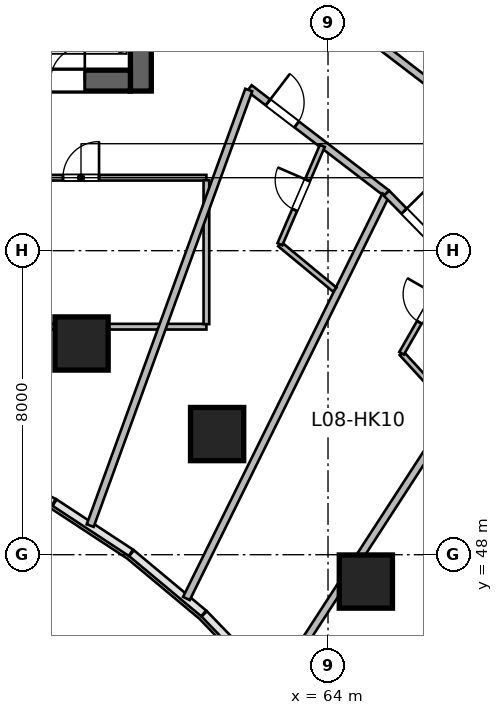
"""IFC4 building model, lengths in metres.
Left out: names, types, materials, properties, quantities, classifications, styles, units other than length and angle.
Written with IfcOpenShell. Run it as: python <this file> out.ifc"""

import sys

from ifc_helpers import new_model, si_unit, direction, frame, frame_2d, origin, origin_2d, place, context, subcontext, project, spatial, rectangle, circle, extrude, source, transform, mapped, element, fill, save


model = new_model("IFC4")
c1 = context("Model", 3, precision=1e-05, world=origin(), true_north=direction((0.0, 1.0)))
c2 = subcontext(c1, "Body", "Model", "MODEL_VIEW")
j1 = project(units=[si_unit("LENGTHUNIT", "METRE"), si_unit("PLANEANGLEUNIT", "RADIAN")], contexts=[c1])
p1 = place(None, origin())
s1 = spatial("IfcSite", under=j1, at=p1, CompositionType="ELEMENT")
p2 = place(p1, origin())
s2 = spatial("IfcBuilding", under=s1, at=p2, CompositionType="ELEMENT")
p3 = place(p2, frame((0.0, 0.0, 42.6)))
s3 = spatial("IfcBuildingStorey", under=s2, at=p3, CompositionType="ELEMENT", Elevation=42.6)
m1 = source(origin(), c2, "Body", "SweptSolid", [
    extrude(rectangle(XDim=12.0, YDim=0.55, at=frame_2d((6.0, 0.0))), origin(), (0.0, 0.0, 1.0), 3.6),
])
p4 = place(p3, frame((59.075, 60.2, 0.0), z_axis=(0.0, 0.0, 1.0), x_axis=(0.0, 1.0, 0.0)))
e1 = element("IfcWall", 1, at=p4, inside=s3, PredefinedType="SHEAR", context=c2, shape_type="MappedRepresentation", body=[
    mapped(m1, transform((0.0, 0.0, 0.0), scale=1.0)),
])
m2 = source(origin(), c2, "Body", "SweptSolid", [
    extrude(rectangle(XDim=21.6, YDim=0.55, at=frame_2d((10.8, 0.0))), origin(), (0.0, 0.0, 1.0), 3.6),
])
p5 = place(p3, frame((37.2, 60.475, 0.0), z_axis=(0.0, 0.0, 1.0), x_axis=(1.0, 0.0, 0.0)))
e2 = element("IfcWall", 2, at=p5, inside=s3, PredefinedType="SHEAR", context=c2, shape_type="MappedRepresentation", body=[
    mapped(m2, transform((0.0, 0.0, 0.0), scale=1.0)),
])
p6 = place(p5, frame((1.1, 0.0, 0.0)))
e3 = element("IfcOpeningElement", 3, at=p6, cuts=e2, PredefinedType="OPENING", context=c2, shape_type="SweptSolid", body=[
    extrude(rectangle(XDim=1.15, YDim=2.15, at=frame_2d((0.575, 1.075))), frame((0.0, 0.285, 0.0), z_axis=(0.0, -1.0, 0.0), x_axis=(1.0, 0.0, 0.0)), (0.0, 0.0, 1.0), 0.57),
])
p7 = place(p5, frame((19.5, 0.0, 0.0)))
e4 = element("IfcOpeningElement", 4, at=p7, cuts=e2, PredefinedType="OPENING", context=c2, shape_type="SweptSolid", body=[
    extrude(rectangle(XDim=0.9, YDim=2.1, at=frame_2d((0.45, 1.05))), frame((0.0, 0.285, 0.0), z_axis=(0.0, -1.0, 0.0), x_axis=(1.0, 0.0, 0.0)), (0.0, 0.0, 1.0), 0.57),
])
p8 = place(p5, frame((12.02, 0.0, 0.0)))
e5 = element("IfcOpeningElement", 5, at=p8, cuts=e2, PredefinedType="OPENING", context=c2, shape_type="SweptSolid", body=[
    extrude(rectangle(XDim=1.6, YDim=2.15, at=frame_2d((0.8, 1.075))), frame((0.0, 0.285, 0.0), z_axis=(0.0, -1.0, 0.0), x_axis=(1.0, 0.0, 0.0)), (0.0, 0.0, 1.0), 0.57),
])
m3 = source(origin(), c2, "Body", "SweptSolid", [
    extrude(circle(Radius=0.7, at=origin_2d()), origin(), (0.0, 0.0, 1.0), 3.6),
])
for number, where, z_axis, x_axis in (
    (6, (57.515, 53.558, 0.0), (0.0, 0.0, 1.0), (0.289, 0.957, 0.0)),
    (7, (61.082, 51.175, 0.0), (0.0, 0.0, 1.0), (0.409, 0.912, 0.0)),
    (8, (64.996, 47.294, 0.0), (0.0, 0.0, 1.0), (0.558, 0.83, 0.0)),
):
    element("IfcColumn", number, at=place(p3, frame(where, z_axis=z_axis, x_axis=x_axis)), inside=s3, PredefinedType="COLUMN", context=c2, shape_type="MappedRepresentation", body=[
        mapped(m3, transform((0.0, 0.0, 0.0), scale=1.0)),
    ])
m4 = source(origin(), c2, "Body", "SweptSolid", [
    extrude(rectangle(XDim=6.6, YDim=0.15, at=frame_2d((3.3, 0.0))), origin(), (0.0, 0.0, 1.0), 2.803),
])
p9 = place(p3, frame((54.2, 54.0, 0.0), z_axis=(0.0, 0.0, 1.0), x_axis=(1.0, 0.0, 0.0)))
e9 = element("IfcWall", 9, at=p9, inside=s3, PredefinedType="PARTITIONING", context=c2, shape_type="MappedRepresentation", body=[
    mapped(m4, transform((0.0, 0.0, 0.0), scale=1.0)),
])
m5 = source(origin(), c2, "Body", "SweptSolid", [
    extrude(rectangle(XDim=6.6, YDim=0.15, at=frame_2d((3.3, 0.0))), origin(), (0.0, 0.0, 1.0), 3.36),
])
p10 = place(p3, frame((54.2, 57.92, 0.0), z_axis=(0.0, 0.0, 1.0), x_axis=(1.0, 0.0, 0.0)))
e10 = element("IfcWall", 10, at=p10, inside=s3, PredefinedType="PARTITIONING", context=c2, shape_type="MappedRepresentation", body=[
    mapped(m5, transform((0.0, 0.0, 0.0), scale=1.0)),
])
p11 = place(p10, frame((2.825, 0.0, 0.0)))
e11 = element("IfcOpeningElement", 11, at=p11, cuts=e10, PredefinedType="OPENING", context=c2, shape_type="SweptSolid", body=[
    extrude(rectangle(XDim=0.95, YDim=2.1, at=frame_2d((0.475, 1.05))), frame((0.0, 0.085, 0.0), z_axis=(0.0, -1.0, 0.0), x_axis=(1.0, 0.0, 0.0)), (0.0, 0.0, 1.0), 0.17),
])
m6 = source(origin(), c2, "Body", "SweptSolid", [
    extrude(rectangle(XDim=3.785, YDim=0.15, at=frame_2d((1.893, 0.0))), origin(), (0.0, 0.0, 1.0), 3.36),
])
p12 = place(p3, frame((60.8, 54.067, 0.0), z_axis=(0.0, 0.0, 1.0), x_axis=(0.0, 1.0, 0.0)))
e12 = element("IfcWall", 12, at=p12, inside=s3, PredefinedType="PARTITIONING", context=c2, shape_type="MappedRepresentation", body=[
    mapped(m6, transform((0.0, 0.0, 0.0), scale=1.0)),
])
m7 = source(origin(), c2, "Body", "SweptSolid", [
    extrude(rectangle(XDim=4.895, YDim=0.195, at=frame_2d((2.447, 0.0))), origin(), (0.0, 0.0, 1.0), 3.36),
])
p13 = place(p3, frame((63.001, 63.214, 0.0), z_axis=(0.0, 0.0, 1.0), x_axis=(0.793896075849, -0.608053468661, 0.0)))
e13 = element("IfcWall", 13, at=p13, inside=s3, PredefinedType="PARTITIONING", context=c2, shape_type="MappedRepresentation", body=[
    mapped(m7, transform((0.0, 0.0, 0.0), scale=1.0)),
])
p14 = place(p13, frame((0.7, 0.0, 0.0)))
e14 = element("IfcOpeningElement", 14, at=p14, cuts=e13, PredefinedType="OPENING", context=c2, shape_type="SweptSolid", body=[
    extrude(rectangle(XDim=0.95, YDim=2.15, at=frame_2d((0.475, 1.075))), frame((0.0, 0.107, 0.0), z_axis=(0.0, -1.0, 0.0), x_axis=(1.0, 0.0, 0.0)), (0.0, 0.0, 1.0), 0.215),
])
m8 = source(origin(), c2, "Body", "SweptSolid", [
    extrude(rectangle(XDim=4.546, YDim=0.195, at=frame_2d((2.273, 0.0))), origin(), (0.0, 0.0, 1.0), 3.36),
])
p15 = place(p3, frame((61.931, 60.275, 0.0), z_axis=(0.0, 0.0, 1.0), x_axis=(0.793907931297, -0.608037989457, 0.0)))
e15 = element("IfcWall", 15, at=p15, inside=s3, PredefinedType="PARTITIONING", context=c2, shape_type="MappedRepresentation", body=[
    mapped(m8, transform((0.0, 0.0, 0.0), scale=1.0)),
])
p16 = place(p15, frame((0.616, 0.0, 0.0)))
e16 = element("IfcOpeningElement", 16, at=p16, cuts=e15, PredefinedType="OPENING", context=c2, shape_type="SweptSolid", body=[
    extrude(rectangle(XDim=0.95, YDim=2.15, at=frame_2d((0.475, 1.075))), frame((0.0, 0.107, 0.0), z_axis=(0.0, -1.0, 0.0), x_axis=(1.0, 0.0, 0.0)), (0.0, 0.0, 1.0), 0.215),
])
m9 = source(origin(), c2, "Body", "SweptSolid", [
    extrude(rectangle(XDim=12.196, YDim=0.195, at=frame_2d((6.098, 0.0))), origin(), (0.0, 0.0, 1.0), 3.36),
])
p17 = place(p3, frame((57.742, 48.766, 0.0), z_axis=(0.0, 0.0, 1.0), x_axis=(0.342022711534, 0.939691686031, 0.0)))
e17 = element("IfcWall", 17, at=p17, inside=s3, PredefinedType="PARTITIONING", context=c2, shape_type="MappedRepresentation", body=[
    mapped(m9, transform((0.0, 0.0, 0.0), scale=1.0)),
])
m10 = source(origin(), c2, "Body", "SweptSolid", [
    extrude(rectangle(XDim=11.844, YDim=0.195, at=frame_2d((5.922, 0.0))), origin(), (0.0, 0.0, 1.0), 3.36),
])
p18 = place(p3, frame((60.273, 46.848, 0.0), z_axis=(0.0, 0.0, 1.0), x_axis=(0.442871152218, 0.896585267854, 0.0)))
e18 = element("IfcWall", 18, at=p18, inside=s3, PredefinedType="PARTITIONING", context=c2, shape_type="MappedRepresentation", body=[
    mapped(m10, transform((0.0, 0.0, 0.0), scale=1.0)),
])
m11 = source(origin(), c2, "Body", "SweptSolid", [
    extrude(rectangle(XDim=1.873, YDim=0.14, at=frame_2d((0.937, 0.0))), origin(), (0.0, 0.0, 1.0), 3.36),
])
p19 = place(p3, frame((62.734, 56.169, 0.0), z_axis=(0.0, 0.0, 1.0), x_axis=(0.77069451688, -0.637204803537, 0.0)))
e19 = element("IfcWall", 19, at=p19, inside=s3, PredefinedType="PARTITIONING", context=c2, shape_type="MappedRepresentation", body=[
    mapped(m11, transform((0.0, 0.0, 0.0), scale=1.0)),
])
m12 = source(origin(), c2, "Body", "SweptSolid", [
    extrude(rectangle(XDim=2.817, YDim=0.14, at=frame_2d((1.409, 0.0))), origin(), (0.0, 0.0, 1.0), 3.36),
])
p20 = place(p3, frame((62.734, 56.169, 0.0), z_axis=(0.0, 0.0, 1.0), x_axis=(0.395999429727, 0.918250756415, 0.0)))
e20 = element("IfcWall", 20, at=p20, inside=s3, PredefinedType="PARTITIONING", context=c2, shape_type="MappedRepresentation", body=[
    mapped(m12, transform((0.0, 0.0, 0.0), scale=1.0)),
])
p21 = place(p20, frame((0.984, 0.0, 0.0)))
e21 = element("IfcOpeningElement", 21, at=p21, cuts=e20, PredefinedType="OPENING", context=c2, shape_type="SweptSolid", body=[
    extrude(rectangle(XDim=0.85, YDim=2.05, at=frame_2d((0.425, 1.025))), frame((0.0, 0.08, 0.0), z_axis=(0.0, -1.0, 0.0), x_axis=(1.0, 0.0, 0.0)), (0.0, 0.0, 1.0), 0.16),
])
m13 = source(origin(), c2, "Body", "SweptSolid", [
    extrude(rectangle(XDim=4.724, YDim=0.195, at=frame_2d((2.362, 0.0))), origin(), (0.0, 0.0, 1.0), 3.36),
])
p22 = place(p3, frame((65.541, 57.511, 0.0), z_axis=(0.0, 0.0, 1.0), x_axis=(0.700435057457, -0.713716141253, 0.0)))
e22 = element("IfcWall", 22, at=p22, inside=s3, PredefinedType="PARTITIONING", context=c2, shape_type="MappedRepresentation", body=[
    mapped(m13, transform((0.0, 0.0, 0.0), scale=1.0)),
])
p23 = place(p22, frame((0.659, 0.0, 0.0)))
e23 = element("IfcOpeningElement", 23, at=p23, cuts=e22, PredefinedType="OPENING", context=c2, shape_type="SweptSolid", body=[
    extrude(rectangle(XDim=0.95, YDim=2.15, at=frame_2d((0.475, 1.075))), frame((0.0, 0.107, 0.0), z_axis=(0.0, -1.0, 0.0), x_axis=(1.0, 0.0, 0.0)), (0.0, 0.0, 1.0), 0.215),
])
m14 = source(origin(), c2, "Body", "SweptSolid", [
    extrude(rectangle(XDim=11.429, YDim=0.195, at=frame_2d((5.714, 0.0))), origin(), (0.0, 0.0, 1.0), 3.36),
])
p24 = place(p3, frame((62.604, 44.511, 0.0), z_axis=(0.0, 0.0, 1.0), x_axis=(0.544215487077, 0.838945471187, 0.0)))
e24 = element("IfcWall", 24, at=p24, inside=s3, PredefinedType="PARTITIONING", context=c2, shape_type="MappedRepresentation", body=[
    mapped(m14, transform((0.0, 0.0, 0.0), scale=1.0)),
])
m15 = source(origin(), c2, "Body", "SweptSolid", [
    extrude(rectangle(XDim=1.947, YDim=0.14, at=frame_2d((0.973, 0.0))), origin(), (0.0, 0.0, 1.0), 2.803),
])
p25 = place(p3, frame((65.936, 53.3, 0.0), z_axis=(0.0, 0.0, 1.0), x_axis=(0.675383794012, -0.737466426888, 0.0)))
e25 = element("IfcWall", 25, at=p25, inside=s3, PredefinedType="PARTITIONING", context=c2, shape_type="MappedRepresentation", body=[
    mapped(m15, transform((0.0, 0.0, 0.0), scale=1.0)),
])
m16 = source(origin(), c2, "Body", "SweptSolid", [
    extrude(rectangle(XDim=2.731, YDim=0.14, at=frame_2d((1.366, 0.0))), origin(), (0.0, 0.0, 1.0), 3.36),
])
p26 = place(p3, frame((65.936, 53.3, 0.0), z_axis=(0.0, 0.0, 1.0), x_axis=(0.497120404056, 0.867681568244, 0.0)))
e26 = element("IfcWall", 26, at=p26, inside=s3, PredefinedType="PARTITIONING", context=c2, shape_type="MappedRepresentation", body=[
    mapped(m16, transform((0.0, 0.0, 0.0), scale=1.0)),
])
p27 = place(p26, frame((0.941, 0.0, 0.0)))
e27 = element("IfcOpeningElement", 27, at=p27, cuts=e26, PredefinedType="OPENING", context=c2, shape_type="SweptSolid", body=[
    extrude(rectangle(XDim=0.85, YDim=2.05, at=frame_2d((0.425, 1.025))), frame((0.0, 0.08, 0.0), z_axis=(0.0, -1.0, 0.0), x_axis=(1.0, 0.0, 0.0)), (0.0, 0.0, 1.0), 0.16),
])
m17 = source(origin(), c2, "Body", "SweptSolid", [
    extrude(rectangle(XDim=11.053, YDim=0.195, at=frame_2d((5.527, 0.0))), origin(), (0.0, 0.0, 1.0), 3.36),
])
p28 = place(p3, frame((64.534, 41.949, 0.0), z_axis=(0.0, 0.0, 1.0), x_axis=(0.638131235571, 0.769927611005, 0.0)))
e28 = element("IfcWall", 28, at=p28, inside=s3, PredefinedType="PARTITIONING", context=c2, shape_type="MappedRepresentation", body=[
    mapped(m17, transform((0.0, 0.0, 0.0), scale=1.0)),
])
m18 = source(origin(), c2, "Body", "SweptSolid", [
    extrude(rectangle(XDim=0.9, YDim=2.1, at=frame_2d((0.45, 1.05))), frame((0.0, 0.025, 0.0), z_axis=(0.0, -1.0, 0.0), x_axis=(1.0, 0.0, 0.0)), (0.0, 0.0, 1.0), 0.05),
])
p29 = place(p7, origin())
e29 = element("IfcDoor", 29, at=p29, inside=s3, OperationType="SINGLE_SWING_RIGHT", PredefinedType="DOOR", context=c2, shape_type="MappedRepresentation", body=[
    mapped(m18, transform((0.0, 0.0, 0.0), scale=1.0)),
])
fill(e4, e29)
m19 = source(origin(), c2, "Body", "SweptSolid", [
    extrude(rectangle(XDim=0.95, YDim=2.1, at=frame_2d((0.475, 1.05))), frame((0.0, 0.025, 0.0), z_axis=(0.0, -1.0, 0.0), x_axis=(1.0, 0.0, 0.0)), (0.0, 0.0, 1.0), 0.05),
])
p30 = place(p11, origin())
e30 = element("IfcDoor", 30, at=p30, inside=s3, OperationType="SINGLE_SWING_RIGHT", PredefinedType="DOOR", context=c2, shape_type="MappedRepresentation", body=[
    mapped(m19, transform((0.0, 0.0, 0.0), scale=1.0)),
])
fill(e11, e30)
m20 = source(origin(), c2, "Body", "SweptSolid", [
    extrude(rectangle(XDim=0.95, YDim=2.15, at=frame_2d((0.475, 1.075))), frame((0.0, 0.025, 0.0), z_axis=(0.0, -1.0, 0.0), x_axis=(1.0, 0.0, 0.0)), (0.0, 0.0, 1.0), 0.05),
])
p31 = place(p16, origin())
e31 = element("IfcDoor", 31, at=p31, inside=s3, OperationType="SINGLE_SWING_LEFT", PredefinedType="DOOR", context=c2, shape_type="MappedRepresentation", body=[
    mapped(m20, transform((0.0, 0.0, 0.0), scale=1.0)),
])
fill(e16, e31)
m21 = source(origin(), c2, "Body", "SweptSolid", [
    extrude(rectangle(XDim=0.85, YDim=2.05, at=frame_2d((0.425, 1.025))), frame((0.0, 0.025, 0.0), z_axis=(0.0, -1.0, 0.0), x_axis=(1.0, 0.0, 0.0)), (0.0, 0.0, 1.0), 0.05),
])
p32 = place(p21, origin())
e32 = element("IfcDoor", 32, at=p32, inside=s3, OperationType="SINGLE_SWING_RIGHT", PredefinedType="DOOR", context=c2, shape_type="MappedRepresentation", body=[
    mapped(m21, transform((0.0, 0.0, 0.0), scale=1.0)),
])
fill(e21, e32)
p33 = place(p23, origin())
e33 = element("IfcDoor", 33, at=p33, inside=s3, OperationType="SINGLE_SWING_LEFT", PredefinedType="DOOR", context=c2, shape_type="MappedRepresentation", body=[
    mapped(m20, transform((0.0, 0.0, 0.0), scale=1.0)),
])
fill(e23, e33)
p34 = place(p27, origin())
e34 = element("IfcDoor", 34, at=p34, inside=s3, OperationType="SINGLE_SWING_RIGHT", PredefinedType="DOOR", context=c2, shape_type="MappedRepresentation", body=[
    mapped(m21, transform((0.0, 0.0, 0.0), scale=1.0)),
])
fill(e27, e34)
save(model, sys.argv[1])
